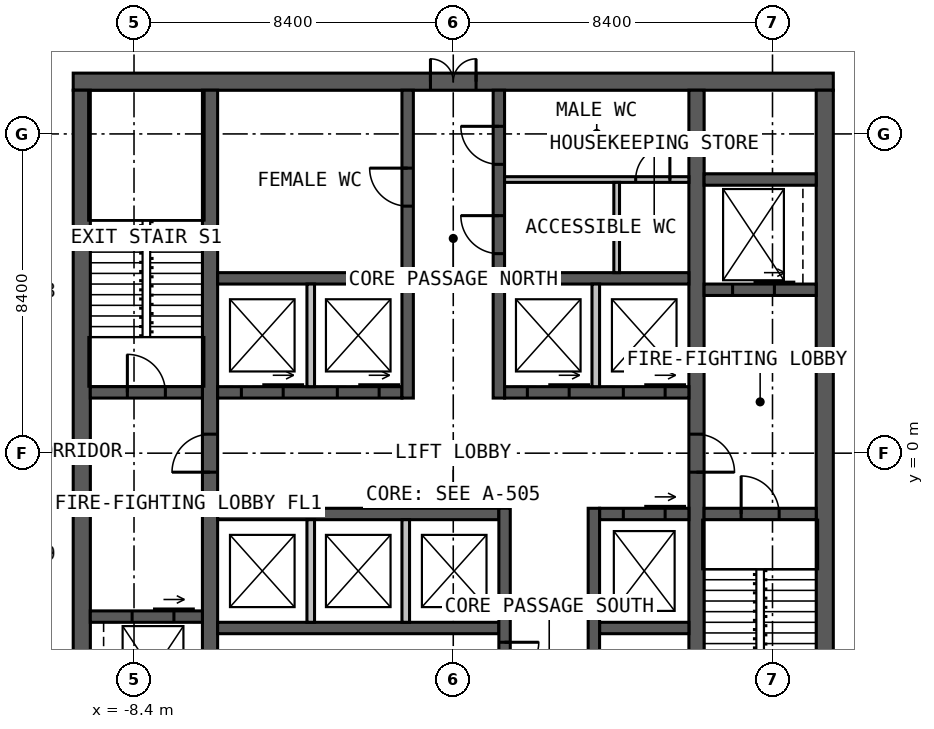
"""IFC4 building model, lengths in metres.
Left out: names, types, materials, properties, quantities, classifications, styles, units other than length and angle.
Written with IfcOpenShell. Run it as: python <this file> out.ifc"""

import sys

from ifc_helpers import new_model, si_unit, direction, frame, frame_2d, origin, place, context, subcontext, project, spatial, rectangle, extrude, element, fill, save


model = new_model("IFC4")
c1 = context("Model", 3, precision=1e-05, world=origin(), true_north=direction((0.0, 1.0)))
c2 = subcontext(c1, "Body", "Model", "MODEL_VIEW")
j1 = project(units=[si_unit("LENGTHUNIT", "METRE"), si_unit("PLANEANGLEUNIT", "RADIAN")], contexts=[c1])
p1 = place(None, origin())
s1 = spatial("IfcSite", under=j1, at=p1, CompositionType="ELEMENT")
p2 = place(p1, origin())
s2 = spatial("IfcBuilding", under=s1, at=p2, CompositionType="ELEMENT")
p3 = place(p2, frame((0.0, 0.0, 199.0)))
s3 = spatial("IfcBuildingStorey", under=s2, at=p3, CompositionType="ELEMENT", Elevation=199.0)
p4 = place(p3, frame((-10.0, 9.775, 0.0), z_axis=(0.0, 0.0, 1.0), x_axis=(1.0, 0.0, 0.0)))
e1 = element("IfcWall", 1, at=p4, inside=s3, PredefinedType="SOLIDWALL", context=c2, shape_type="SweptSolid", body=[
    extrude(rectangle(XDim=20.0, YDim=0.45, at=frame_2d((10.0, 0.0))), origin(), (0.0, 0.0, 1.0), 4.0),
])
p5 = place(p4, frame((9.4, 0.0, 0.0)))
e2 = element("IfcOpeningElement", 2, at=p5, cuts=e1, PredefinedType="OPENING", context=c2, shape_type="SweptSolid", body=[
    extrude(rectangle(XDim=1.2, YDim=2.2, at=frame_2d((0.6, 1.1))), frame((0.0, 0.235, 0.0), z_axis=(0.0, -1.0, 0.0), x_axis=(1.0, 0.0, 0.0)), (0.0, 0.0, 1.0), 0.47),
])
for number, where, z_axis, x_axis in (
    (3, (9.775, -9.55, 0.0), (0.0, 0.0, 1.0), (0.0, 1.0, 0.0)),
    (4, (-9.775, 9.55, 0.0), (0.0, 0.0, 1.0), (0.0, -1.0, 0.0)),
):
    element("IfcWall", number, at=place(p3, frame(where, z_axis=z_axis, x_axis=x_axis)), inside=s3, PredefinedType="SOLIDWALL", context=c2, shape_type="SweptSolid", body=[
        extrude(rectangle(XDim=19.1, YDim=0.45, at=frame_2d((9.55, 0.0))), origin(), (0.0, 0.0, 1.0), 4.0),
    ])
p6 = place(p3, frame((-6.4, -9.55, 0.0), z_axis=(0.0, 0.0, 1.0), x_axis=(0.0, 1.0, 0.0)))
e5 = element("IfcWall", 5, at=p6, inside=s3, PredefinedType="SOLIDWALL", context=c2, shape_type="SweptSolid", body=[
    extrude(rectangle(XDim=19.1, YDim=0.4, at=frame_2d((9.55, 0.0))), origin(), (0.0, 0.0, 1.0), 4.0),
])
p7 = place(p6, frame((9.05, 0.0, 0.0)))
e6 = element("IfcOpeningElement", 6, at=p7, cuts=e5, PredefinedType="OPENING", context=c2, shape_type="SweptSolid", body=[
    extrude(rectangle(XDim=1.0, YDim=2.2, at=frame_2d((0.5, 1.1))), frame((0.0, 0.21, 0.0), z_axis=(0.0, -1.0, 0.0), x_axis=(1.0, 0.0, 0.0)), (0.0, 0.0, 1.0), 0.42),
])
p8 = place(p3, frame((6.4, 9.55, 0.0), z_axis=(0.0, 0.0, 1.0), x_axis=(0.0, -1.0, 0.0)))
e7 = element("IfcWall", 7, at=p8, inside=s3, PredefinedType="SOLIDWALL", context=c2, shape_type="SweptSolid", body=[
    extrude(rectangle(XDim=19.1, YDim=0.4, at=frame_2d((9.55, 0.0))), origin(), (0.0, 0.0, 1.0), 4.0),
])
p9 = place(p8, frame((9.05, 0.0, 0.0)))
e8 = element("IfcOpeningElement", 8, at=p9, cuts=e7, PredefinedType="OPENING", context=c2, shape_type="SweptSolid", body=[
    extrude(rectangle(XDim=1.0, YDim=2.2, at=frame_2d((0.5, 1.1))), frame((0.0, 0.21, 0.0), z_axis=(0.0, -1.0, 0.0), x_axis=(1.0, 0.0, 0.0)), (0.0, 0.0, 1.0), 0.42),
])
p10 = place(p3, frame((-6.2, 1.6, 0.0), z_axis=(0.0, 0.0, 1.0), x_axis=(1.0, 0.0, 0.0)))
e9 = element("IfcWall", 9, at=p10, inside=s3, PredefinedType="SOLIDWALL", context=c2, shape_type="SweptSolid", body=[
    extrude(rectangle(XDim=4.85, YDim=0.3, at=frame_2d((2.425, 0.0))), origin(), (0.0, 0.0, 1.0), 4.0),
])
p11 = place(p10, frame((0.625, 0.0, 0.0)))
e10 = element("IfcOpeningElement", 10, at=p11, cuts=e9, PredefinedType="OPENING", context=c2, shape_type="SweptSolid", body=[
    extrude(rectangle(XDim=1.1, YDim=2.2, at=frame_2d((0.55, 1.1))), frame((0.0, 0.16, 0.0), z_axis=(0.0, -1.0, 0.0), x_axis=(1.0, 0.0, 0.0)), (0.0, 0.0, 1.0), 0.32),
])
p12 = place(p10, frame((3.15, 0.0, 0.0)))
e11 = element("IfcOpeningElement", 11, at=p12, cuts=e9, PredefinedType="OPENING", context=c2, shape_type="SweptSolid", body=[
    extrude(rectangle(XDim=1.1, YDim=2.2, at=frame_2d((0.55, 1.1))), frame((0.0, 0.16, 0.0), z_axis=(0.0, -1.0, 0.0), x_axis=(1.0, 0.0, 0.0)), (0.0, 0.0, 1.0), 0.32),
])
p13 = place(p3, frame((1.35, 1.6, 0.0), z_axis=(0.0, 0.0, 1.0), x_axis=(1.0, 0.0, 0.0)))
e12 = element("IfcWall", 12, at=p13, inside=s3, PredefinedType="SOLIDWALL", context=c2, shape_type="SweptSolid", body=[
    extrude(rectangle(XDim=4.85, YDim=0.3, at=frame_2d((2.425, 0.0))), origin(), (0.0, 0.0, 1.0), 4.0),
])
p14 = place(p13, frame((0.6, 0.0, 0.0)))
e13 = element("IfcOpeningElement", 13, at=p14, cuts=e12, PredefinedType="OPENING", context=c2, shape_type="SweptSolid", body=[
    extrude(rectangle(XDim=1.1, YDim=2.2, at=frame_2d((0.55, 1.1))), frame((0.0, 0.16, 0.0), z_axis=(0.0, -1.0, 0.0), x_axis=(1.0, 0.0, 0.0)), (0.0, 0.0, 1.0), 0.32),
])
p15 = place(p13, frame((3.125, 0.0, 0.0)))
e14 = element("IfcOpeningElement", 14, at=p15, cuts=e12, PredefinedType="OPENING", context=c2, shape_type="SweptSolid", body=[
    extrude(rectangle(XDim=1.1, YDim=2.2, at=frame_2d((0.55, 1.1))), frame((0.0, 0.16, 0.0), z_axis=(0.0, -1.0, 0.0), x_axis=(1.0, 0.0, 0.0)), (0.0, 0.0, 1.0), 0.32),
])
for number, where, z_axis, x_axis in (
    (15, (-6.2, 4.6, 0.0), (0.0, 0.0, 1.0), (1.0, 0.0, 0.0)),
    (16, (1.35, 4.6, 0.0), (0.0, 0.0, 1.0), (1.0, 0.0, 0.0)),
):
    element("IfcWall", number, at=place(p3, frame(where, z_axis=z_axis, x_axis=x_axis)), inside=s3, PredefinedType="SOLIDWALL", context=c2, shape_type="SweptSolid", body=[
        extrude(rectangle(XDim=4.85, YDim=0.3, at=frame_2d((2.425, 0.0))), origin(), (0.0, 0.0, 1.0), 4.0),
    ])
p16 = place(p3, frame((-1.2, 1.45, 0.0), z_axis=(0.0, 0.0, 1.0), x_axis=(0.0, 1.0, 0.0)))
e17 = element("IfcWall", 17, at=p16, inside=s3, PredefinedType="SOLIDWALL", context=c2, shape_type="SweptSolid", body=[
    extrude(rectangle(XDim=8.1, YDim=0.3, at=frame_2d((4.05, 0.0))), origin(), (0.0, 0.0, 1.0), 4.0),
])
p17 = place(p16, frame((5.05, 0.0, 0.0)))
e18 = element("IfcOpeningElement", 18, at=p17, cuts=e17, PredefinedType="OPENING", context=c2, shape_type="SweptSolid", body=[
    extrude(rectangle(XDim=1.0, YDim=2.2, at=frame_2d((0.5, 1.1))), frame((0.0, 0.16, 0.0), z_axis=(0.0, -1.0, 0.0), x_axis=(1.0, 0.0, 0.0)), (0.0, 0.0, 1.0), 0.32),
])
p18 = place(p3, frame((1.2, 1.45, 0.0), z_axis=(0.0, 0.0, 1.0), x_axis=(0.0, 1.0, 0.0)))
e19 = element("IfcWall", 19, at=p18, inside=s3, PredefinedType="SOLIDWALL", context=c2, shape_type="SweptSolid", body=[
    extrude(rectangle(XDim=8.1, YDim=0.3, at=frame_2d((4.05, 0.0))), origin(), (0.0, 0.0, 1.0), 4.0),
])
p19 = place(p18, frame((3.8, 0.0, 0.0)))
e20 = element("IfcOpeningElement", 20, at=p19, cuts=e19, PredefinedType="OPENING", context=c2, shape_type="SweptSolid", body=[
    extrude(rectangle(XDim=1.0, YDim=2.2, at=frame_2d((0.5, 1.1))), frame((0.0, 0.16, 0.0), z_axis=(0.0, -1.0, 0.0), x_axis=(1.0, 0.0, 0.0)), (0.0, 0.0, 1.0), 0.32),
])
p20 = place(p18, frame((6.15, 0.0, 0.0)))
e21 = element("IfcOpeningElement", 21, at=p20, cuts=e19, PredefinedType="OPENING", context=c2, shape_type="SweptSolid", body=[
    extrude(rectangle(XDim=1.0, YDim=2.2, at=frame_2d((0.5, 1.1))), frame((0.0, 0.16, 0.0), z_axis=(0.0, -1.0, 0.0), x_axis=(1.0, 0.0, 0.0)), (0.0, 0.0, 1.0), 0.32),
])
p21 = place(p3, frame((-6.2, -1.6, 0.0), z_axis=(0.0, 0.0, 1.0), x_axis=(1.0, 0.0, 0.0)))
e22 = element("IfcWall", 22, at=p21, inside=s3, PredefinedType="SOLIDWALL", context=c2, shape_type="SweptSolid", body=[
    extrude(rectangle(XDim=7.4, YDim=0.3, at=frame_2d((3.7, 0.0))), origin(), (0.0, 0.0, 1.0), 4.0),
])
p22 = place(p3, frame((3.85, -1.6, 0.0), z_axis=(0.0, 0.0, 1.0), x_axis=(1.0, 0.0, 0.0)))
e23 = element("IfcWall", 23, at=p22, inside=s3, PredefinedType="SOLIDWALL", context=c2, shape_type="SweptSolid", body=[
    extrude(rectangle(XDim=2.35, YDim=0.3, at=frame_2d((1.175, 0.0))), origin(), (0.0, 0.0, 1.0), 4.0),
])
p23 = place(p22, frame((0.625, 0.0, 0.0)))
e24 = element("IfcOpeningElement", 24, at=p23, cuts=e23, PredefinedType="OPENING", context=c2, shape_type="SweptSolid", body=[
    extrude(rectangle(XDim=1.1, YDim=2.2, at=frame_2d((0.55, 1.1))), frame((0.0, 0.16, 0.0), z_axis=(0.0, -1.0, 0.0), x_axis=(1.0, 0.0, 0.0)), (0.0, 0.0, 1.0), 0.32),
])
p24 = place(p3, frame((-6.2, -4.6, 0.0), z_axis=(0.0, 0.0, 1.0), x_axis=(1.0, 0.0, 0.0)))
e25 = element("IfcWall", 25, at=p24, inside=s3, PredefinedType="SOLIDWALL", context=c2, shape_type="SweptSolid", body=[
    extrude(rectangle(XDim=7.4, YDim=0.3, at=frame_2d((3.7, 0.0))), origin(), (0.0, 0.0, 1.0), 4.0),
])
p25 = place(p3, frame((3.85, -4.6, 0.0), z_axis=(0.0, 0.0, 1.0), x_axis=(1.0, 0.0, 0.0)))
e26 = element("IfcWall", 26, at=p25, inside=s3, PredefinedType="SOLIDWALL", context=c2, shape_type="SweptSolid", body=[
    extrude(rectangle(XDim=2.35, YDim=0.3, at=frame_2d((1.175, 0.0))), origin(), (0.0, 0.0, 1.0), 4.0),
])
p26 = place(p3, frame((1.35, -1.45, 0.0), z_axis=(0.0, 0.0, 1.0), x_axis=(0.0, -1.0, 0.0)))
e27 = element("IfcWall", 27, at=p26, inside=s3, PredefinedType="SOLIDWALL", context=c2, shape_type="SweptSolid", body=[
    extrude(rectangle(XDim=8.1, YDim=0.3, at=frame_2d((4.05, 0.0))), origin(), (0.0, 0.0, 1.0), 4.0),
])
p27 = place(p26, frame((5.975, 0.0, 0.0)))
e28 = element("IfcOpeningElement", 28, at=p27, cuts=e27, PredefinedType="OPENING", context=c2, shape_type="SweptSolid", body=[
    extrude(rectangle(XDim=1.0, YDim=2.2, at=frame_2d((0.5, 1.1))), frame((0.0, 0.16, 0.0), z_axis=(0.0, -1.0, 0.0), x_axis=(1.0, 0.0, 0.0)), (0.0, 0.0, 1.0), 0.32),
])
p28 = place(p26, frame((3.525, 0.0, 0.0)))
e29 = element("IfcOpeningElement", 29, at=p28, cuts=e27, PredefinedType="OPENING", context=c2, shape_type="SweptSolid", body=[
    extrude(rectangle(XDim=0.9, YDim=2.2, at=frame_2d((0.45, 1.1))), frame((0.0, 0.16, 0.0), z_axis=(0.0, -1.0, 0.0), x_axis=(1.0, 0.0, 0.0)), (0.0, 0.0, 1.0), 0.32),
])
p29 = place(p3, frame((3.7, -1.45, 0.0), z_axis=(0.0, 0.0, 1.0), x_axis=(0.0, -1.0, 0.0)))
e30 = element("IfcWall", 30, at=p29, inside=s3, PredefinedType="SOLIDWALL", context=c2, shape_type="SweptSolid", body=[
    extrude(rectangle(XDim=8.1, YDim=0.3, at=frame_2d((4.05, 0.0))), origin(), (0.0, 0.0, 1.0), 4.0),
])
p30 = place(p29, frame((5.1, 0.0, 0.0)))
e31 = element("IfcOpeningElement", 31, at=p30, cuts=e30, PredefinedType="OPENING", context=c2, shape_type="SweptSolid", body=[
    extrude(rectangle(XDim=0.9, YDim=2.2, at=frame_2d((0.45, 1.1))), frame((0.0, 0.16, 0.0), z_axis=(0.0, -1.0, 0.0), x_axis=(1.0, 0.0, 0.0)), (0.0, 0.0, 1.0), 0.32),
])
p31 = place(p3, frame((-9.55, 1.6, 0.0), z_axis=(0.0, 0.0, 1.0), x_axis=(1.0, 0.0, 0.0)))
e32 = element("IfcWall", 32, at=p31, inside=s3, PredefinedType="SOLIDWALL", context=c2, shape_type="SweptSolid", body=[
    extrude(rectangle(XDim=2.95, YDim=0.3, at=frame_2d((1.475, 0.0))), origin(), (0.0, 0.0, 1.0), 4.0),
])
p32 = place(p31, frame((0.975, 0.0, 0.0)))
e33 = element("IfcOpeningElement", 33, at=p32, cuts=e32, PredefinedType="OPENING", context=c2, shape_type="SweptSolid", body=[
    extrude(rectangle(XDim=1.0, YDim=2.2, at=frame_2d((0.5, 1.1))), frame((0.0, 0.16, 0.0), z_axis=(0.0, -1.0, 0.0), x_axis=(1.0, 0.0, 0.0)), (0.0, 0.0, 1.0), 0.32),
])
p33 = place(p3, frame((6.6, -1.6, 0.0), z_axis=(0.0, 0.0, 1.0), x_axis=(1.0, 0.0, 0.0)))
e34 = element("IfcWall", 34, at=p33, inside=s3, PredefinedType="SOLIDWALL", context=c2, shape_type="SweptSolid", body=[
    extrude(rectangle(XDim=2.95, YDim=0.3, at=frame_2d((1.475, 0.0))), origin(), (0.0, 0.0, 1.0), 4.0),
])
p34 = place(p33, frame((0.975, 0.0, 0.0)))
e35 = element("IfcOpeningElement", 35, at=p34, cuts=e34, PredefinedType="OPENING", context=c2, shape_type="SweptSolid", body=[
    extrude(rectangle(XDim=1.0, YDim=2.2, at=frame_2d((0.5, 1.1))), frame((0.0, 0.16, 0.0), z_axis=(0.0, -1.0, 0.0), x_axis=(1.0, 0.0, 0.0)), (0.0, 0.0, 1.0), 0.32),
])
p35 = place(p3, frame((-9.55, -4.3, 0.0), z_axis=(0.0, 0.0, 1.0), x_axis=(1.0, 0.0, 0.0)))
e36 = element("IfcWall", 36, at=p35, inside=s3, PredefinedType="SOLIDWALL", context=c2, shape_type="SweptSolid", body=[
    extrude(rectangle(XDim=2.95, YDim=0.3, at=frame_2d((1.475, 0.0))), origin(), (0.0, 0.0, 1.0), 4.0),
])
p36 = place(p35, frame((1.1, 0.0, 0.0)))
e37 = element("IfcOpeningElement", 37, at=p36, cuts=e36, PredefinedType="OPENING", context=c2, shape_type="SweptSolid", body=[
    extrude(rectangle(XDim=1.1, YDim=2.2, at=frame_2d((0.55, 1.1))), frame((0.0, 0.16, 0.0), z_axis=(0.0, -1.0, 0.0), x_axis=(1.0, 0.0, 0.0)), (0.0, 0.0, 1.0), 0.32),
])
p37 = place(p3, frame((6.6, 4.3, 0.0), z_axis=(0.0, 0.0, 1.0), x_axis=(1.0, 0.0, 0.0)))
e38 = element("IfcWall", 38, at=p37, inside=s3, PredefinedType="SOLIDWALL", context=c2, shape_type="SweptSolid", body=[
    extrude(rectangle(XDim=2.95, YDim=0.3, at=frame_2d((1.475, 0.0))), origin(), (0.0, 0.0, 1.0), 4.0),
])
p38 = place(p37, frame((0.75, 0.0, 0.0)))
e39 = element("IfcOpeningElement", 39, at=p38, cuts=e38, PredefinedType="OPENING", context=c2, shape_type="SweptSolid", body=[
    extrude(rectangle(XDim=1.1, YDim=2.2, at=frame_2d((0.55, 1.1))), frame((0.0, 0.16, 0.0), z_axis=(0.0, -1.0, 0.0), x_axis=(1.0, 0.0, 0.0)), (0.0, 0.0, 1.0), 0.32),
])
p39 = place(p3, frame((6.6, 7.2, 0.0), z_axis=(0.0, 0.0, 1.0), x_axis=(1.0, 0.0, 0.0)))
e40 = element("IfcWall", 40, at=p39, inside=s3, PredefinedType="SOLIDWALL", context=c2, shape_type="SweptSolid", body=[
    extrude(rectangle(XDim=2.95, YDim=0.3, at=frame_2d((1.475, 0.0))), origin(), (0.0, 0.0, 1.0), 4.0),
])
for number, where, z_axis, x_axis in (
    (41, (-3.75, 1.75, 0.0), (0.0, 0.0, 1.0), (0.0, 1.0, 0.0)),
    (42, (3.75, 1.75, 0.0), (0.0, 0.0, 1.0), (0.0, 1.0, 0.0)),
    (43, (-3.75, -1.75, 0.0), (0.0, 0.0, 1.0), (0.0, -1.0, 0.0)),
    (44, (-1.25, -1.75, 0.0), (0.0, 0.0, 1.0), (0.0, -1.0, 0.0)),
):
    element("IfcWall", number, at=place(p3, frame(where, z_axis=z_axis, x_axis=x_axis)), inside=s3, PredefinedType="SOLIDWALL", context=c2, shape_type="SweptSolid", body=[
        extrude(rectangle(XDim=2.7, YDim=0.2, at=frame_2d((1.35, 0.0))), origin(), (0.0, 0.0, 1.0), 3.75),
    ])
p40 = place(p3, frame((1.35, 7.2, 0.0), z_axis=(0.0, 0.0, 1.0), x_axis=(1.0, 0.0, 0.0)))
e45 = element("IfcWall", 45, at=p40, inside=s3, PredefinedType="PARTITIONING", context=c2, shape_type="SweptSolid", body=[
    extrude(rectangle(XDim=4.85, YDim=0.15, at=frame_2d((2.425, 0.0))), origin(), (0.0, 0.0, 1.0), 3.75),
])
p41 = place(p40, frame((3.45, 0.0, 0.0)))
e46 = element("IfcOpeningElement", 46, at=p41, cuts=e45, PredefinedType="OPENING", context=c2, shape_type="SweptSolid", body=[
    extrude(rectangle(XDim=0.9, YDim=2.2, at=frame_2d((0.45, 1.1))), frame((0.0, 0.085, 0.0), z_axis=(0.0, -1.0, 0.0), x_axis=(1.0, 0.0, 0.0)), (0.0, 0.0, 1.0), 0.17),
])
p42 = place(p3, frame((4.3, 4.75, 0.0), z_axis=(0.0, 0.0, 1.0), x_axis=(0.0, 1.0, 0.0)))
e47 = element("IfcWall", 47, at=p42, inside=s3, PredefinedType="PARTITIONING", context=c2, shape_type="SweptSolid", body=[
    extrude(rectangle(XDim=2.375, YDim=0.15, at=frame_2d((1.188, 0.0))), origin(), (0.0, 0.0, 1.0), 3.75),
])
p43 = place(p5, origin())
e48 = element("IfcDoor", 48, at=p43, inside=s3, OperationType="DOUBLE_DOOR_SINGLE_SWING", PredefinedType="DOOR", context=c2, shape_type="SweptSolid", body=[
    extrude(rectangle(XDim=1.2, YDim=2.2, at=frame_2d((0.6, 1.1))), frame((0.0, 0.025, 0.0), z_axis=(0.0, -1.0, 0.0), x_axis=(1.0, 0.0, 0.0)), (0.0, 0.0, 1.0), 0.05),
])
fill(e2, e48)
p44 = place(p7, origin())
e49 = element("IfcDoor", 49, at=p44, inside=s3, OperationType="SINGLE_SWING_LEFT", PredefinedType="DOOR", context=c2, shape_type="SweptSolid", body=[
    extrude(rectangle(XDim=1.0, YDim=2.2, at=frame_2d((0.5, 1.1))), frame((0.0, 0.025, 0.0), z_axis=(0.0, -1.0, 0.0), x_axis=(1.0, 0.0, 0.0)), (0.0, 0.0, 1.0), 0.05),
])
fill(e6, e49)
p45 = place(p9, origin())
e50 = element("IfcDoor", 50, at=p45, inside=s3, OperationType="SINGLE_SWING_RIGHT", PredefinedType="DOOR", context=c2, shape_type="SweptSolid", body=[
    extrude(rectangle(XDim=1.0, YDim=2.2, at=frame_2d((0.5, 1.1))), frame((0.0, 0.025, 0.0), z_axis=(0.0, -1.0, 0.0), x_axis=(1.0, 0.0, 0.0)), (0.0, 0.0, 1.0), 0.05),
])
fill(e8, e50)
p46 = place(p32, origin())
e51 = element("IfcDoor", 51, at=p46, inside=s3, OperationType="SINGLE_SWING_LEFT", PredefinedType="DOOR", context=c2, shape_type="SweptSolid", body=[
    extrude(rectangle(XDim=1.0, YDim=2.2, at=frame_2d((0.5, 1.1))), frame((0.0, 0.025, 0.0), z_axis=(0.0, -1.0, 0.0), x_axis=(1.0, 0.0, 0.0)), (0.0, 0.0, 1.0), 0.05),
])
fill(e33, e51)
p47 = place(p34, origin())
e52 = element("IfcDoor", 52, at=p47, inside=s3, OperationType="SINGLE_SWING_LEFT", PredefinedType="DOOR", context=c2, shape_type="SweptSolid", body=[
    extrude(rectangle(XDim=1.0, YDim=2.2, at=frame_2d((0.5, 1.1))), frame((0.0, 0.025, 0.0), z_axis=(0.0, -1.0, 0.0), x_axis=(1.0, 0.0, 0.0)), (0.0, 0.0, 1.0), 0.05),
])
fill(e35, e52)
p48 = place(p17, origin())
e53 = element("IfcDoor", 53, at=p48, inside=s3, OperationType="SINGLE_SWING_RIGHT", PredefinedType="DOOR", context=c2, shape_type="SweptSolid", body=[
    extrude(rectangle(XDim=1.0, YDim=2.2, at=frame_2d((0.5, 1.1))), frame((0.0, 0.025, 0.0), z_axis=(0.0, -1.0, 0.0), x_axis=(1.0, 0.0, 0.0)), (0.0, 0.0, 1.0), 0.05),
])
fill(e18, e53)
p49 = place(p19, origin())
e54 = element("IfcDoor", 54, at=p49, inside=s3, OperationType="SINGLE_SWING_RIGHT", PredefinedType="DOOR", context=c2, shape_type="SweptSolid", body=[
    extrude(rectangle(XDim=1.0, YDim=2.2, at=frame_2d((0.5, 1.1))), frame((0.0, 0.025, 0.0), z_axis=(0.0, -1.0, 0.0), x_axis=(1.0, 0.0, 0.0)), (0.0, 0.0, 1.0), 0.05),
])
fill(e20, e54)
p50 = place(p20, origin())
e55 = element("IfcDoor", 55, at=p50, inside=s3, OperationType="SINGLE_SWING_RIGHT", PredefinedType="DOOR", context=c2, shape_type="SweptSolid", body=[
    extrude(rectangle(XDim=1.0, YDim=2.2, at=frame_2d((0.5, 1.1))), frame((0.0, 0.025, 0.0), z_axis=(0.0, -1.0, 0.0), x_axis=(1.0, 0.0, 0.0)), (0.0, 0.0, 1.0), 0.05),
])
fill(e21, e55)
p51 = place(p28, origin())
e56 = element("IfcDoor", 56, at=p51, inside=s3, OperationType="SINGLE_SWING_LEFT", PredefinedType="DOOR", context=c2, shape_type="SweptSolid", body=[
    extrude(rectangle(XDim=0.9, YDim=2.2, at=frame_2d((0.45, 1.1))), frame((0.0, 0.025, 0.0), z_axis=(0.0, -1.0, 0.0), x_axis=(1.0, 0.0, 0.0)), (0.0, 0.0, 1.0), 0.05),
])
fill(e29, e56)
p52 = place(p41, origin())
e57 = element("IfcDoor", 57, at=p52, inside=s3, OperationType="SINGLE_SWING_RIGHT", PredefinedType="DOOR", context=c2, shape_type="SweptSolid", body=[
    extrude(rectangle(XDim=0.9, YDim=2.2, at=frame_2d((0.45, 1.1))), frame((0.0, 0.025, 0.0), z_axis=(0.0, -1.0, 0.0), x_axis=(1.0, 0.0, 0.0)), (0.0, 0.0, 1.0), 0.05),
])
fill(e46, e57)
p53 = place(p11, origin())
e58 = element("IfcDoor", 58, at=p53, inside=s3, OperationType="SLIDING_TO_LEFT", PredefinedType="DOOR", context=c2, shape_type="SweptSolid", body=[
    extrude(rectangle(XDim=1.1, YDim=2.2, at=frame_2d((0.55, 1.1))), frame((0.0, 0.025, 0.0), z_axis=(0.0, -1.0, 0.0), x_axis=(1.0, 0.0, 0.0)), (0.0, 0.0, 1.0), 0.05),
])
fill(e10, e58)
p54 = place(p12, origin())
e59 = element("IfcDoor", 59, at=p54, inside=s3, OperationType="SLIDING_TO_LEFT", PredefinedType="DOOR", context=c2, shape_type="SweptSolid", body=[
    extrude(rectangle(XDim=1.1, YDim=2.2, at=frame_2d((0.55, 1.1))), frame((0.0, 0.025, 0.0), z_axis=(0.0, -1.0, 0.0), x_axis=(1.0, 0.0, 0.0)), (0.0, 0.0, 1.0), 0.05),
])
fill(e11, e59)
p55 = place(p14, origin())
e60 = element("IfcDoor", 60, at=p55, inside=s3, OperationType="SLIDING_TO_LEFT", PredefinedType="DOOR", context=c2, shape_type="SweptSolid", body=[
    extrude(rectangle(XDim=1.1, YDim=2.2, at=frame_2d((0.55, 1.1))), frame((0.0, 0.025, 0.0), z_axis=(0.0, -1.0, 0.0), x_axis=(1.0, 0.0, 0.0)), (0.0, 0.0, 1.0), 0.05),
])
fill(e13, e60)
p56 = place(p15, origin())
e61 = element("IfcDoor", 61, at=p56, inside=s3, OperationType="SLIDING_TO_LEFT", PredefinedType="DOOR", context=c2, shape_type="SweptSolid", body=[
    extrude(rectangle(XDim=1.1, YDim=2.2, at=frame_2d((0.55, 1.1))), frame((0.0, 0.025, 0.0), z_axis=(0.0, -1.0, 0.0), x_axis=(1.0, 0.0, 0.0)), (0.0, 0.0, 1.0), 0.05),
])
fill(e14, e61)
p57 = place(p23, origin())
e62 = element("IfcDoor", 62, at=p57, inside=s3, OperationType="SLIDING_TO_LEFT", PredefinedType="DOOR", context=c2, shape_type="SweptSolid", body=[
    extrude(rectangle(XDim=1.1, YDim=2.2, at=frame_2d((0.55, 1.1))), frame((0.0, 0.025, 0.0), z_axis=(0.0, -1.0, 0.0), x_axis=(1.0, 0.0, 0.0)), (0.0, 0.0, 1.0), 0.05),
])
fill(e24, e62)
p58 = place(p36, origin())
e63 = element("IfcDoor", 63, at=p58, inside=s3, OperationType="SLIDING_TO_LEFT", PredefinedType="DOOR", context=c2, shape_type="SweptSolid", body=[
    extrude(rectangle(XDim=1.1, YDim=2.2, at=frame_2d((0.55, 1.1))), frame((0.0, 0.025, 0.0), z_axis=(0.0, -1.0, 0.0), x_axis=(1.0, 0.0, 0.0)), (0.0, 0.0, 1.0), 0.05),
])
fill(e37, e63)
p59 = place(p38, origin())
e64 = element("IfcDoor", 64, at=p59, inside=s3, OperationType="SLIDING_TO_LEFT", PredefinedType="DOOR", context=c2, shape_type="SweptSolid", body=[
    extrude(rectangle(XDim=1.1, YDim=2.2, at=frame_2d((0.55, 1.1))), frame((0.0, 0.025, 0.0), z_axis=(0.0, -1.0, 0.0), x_axis=(1.0, 0.0, 0.0)), (0.0, 0.0, 1.0), 0.05),
])
fill(e39, e64)
save(model, sys.argv[1])
